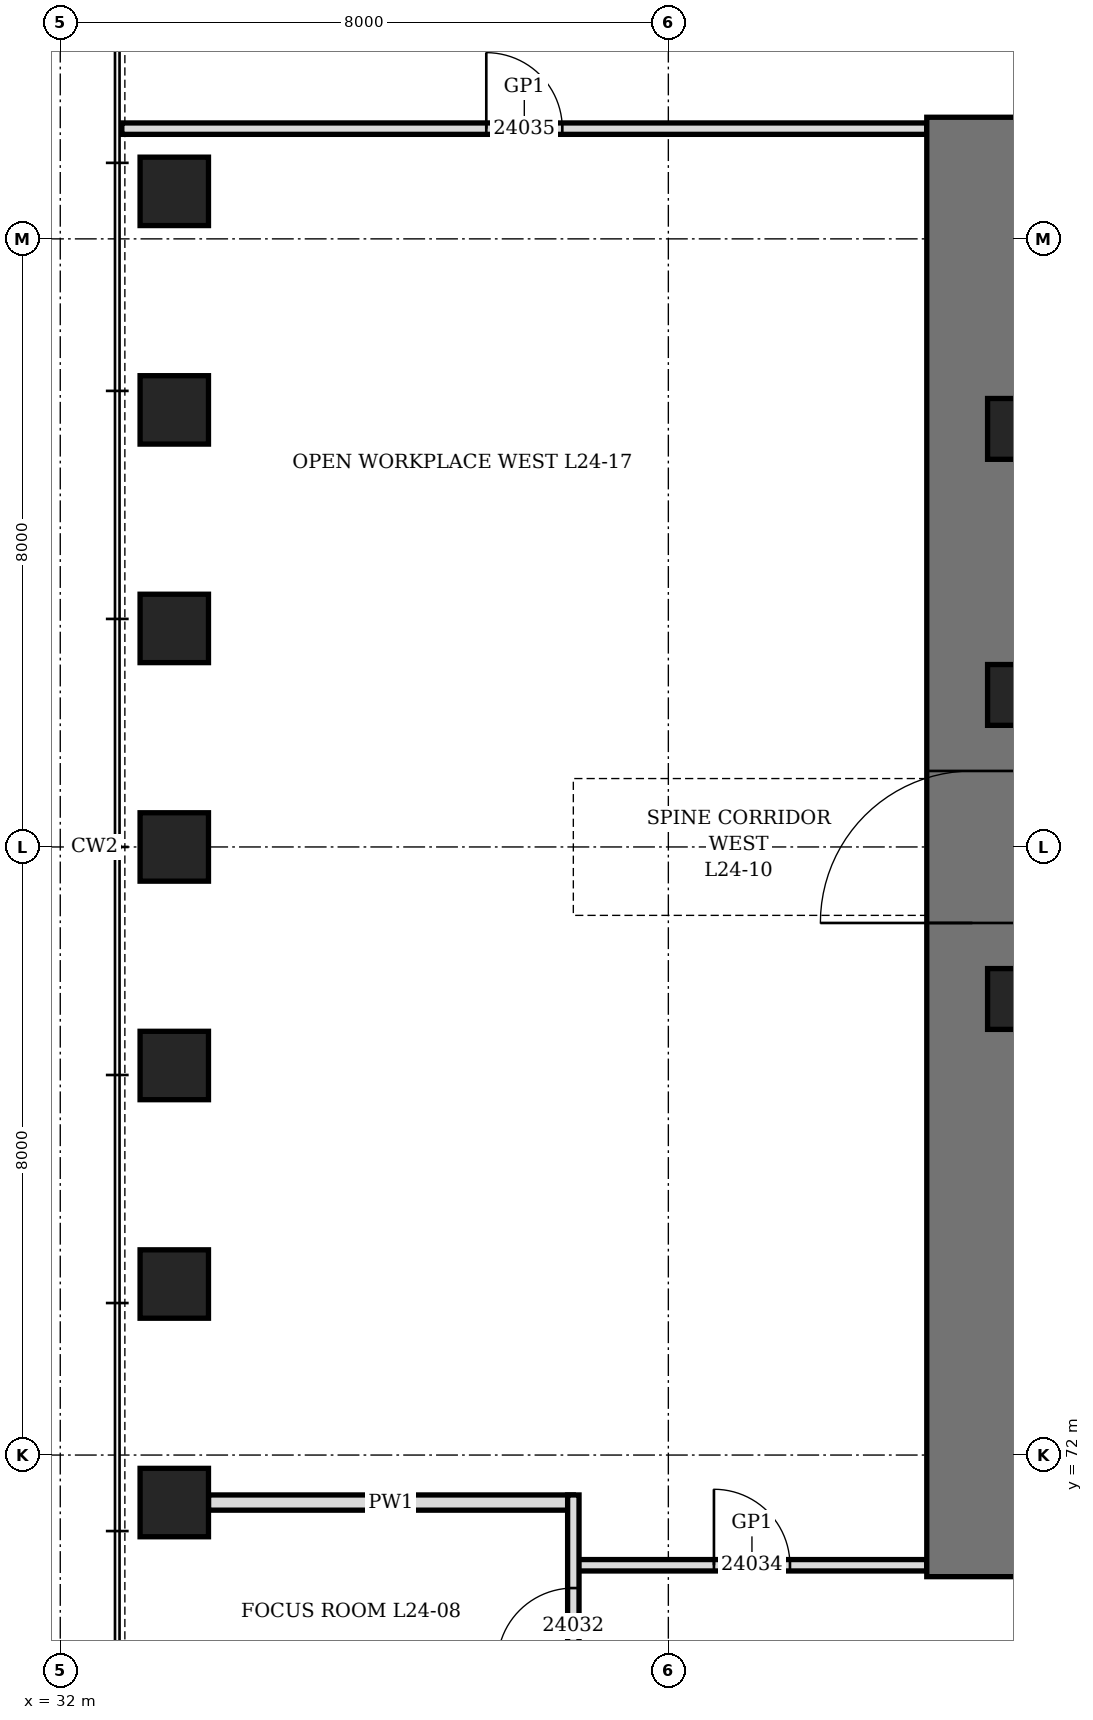
"""IFC4 building model, lengths in metres.
Left out: names, types, materials, properties, quantities, classifications, styles, units other than length and angle.
Written with IfcOpenShell. Run it as: python <this file> out.ifc"""

import sys

from ifc_helpers import new_model, si_unit, direction, frame, frame_2d, origin, origin_2d, place, context, subcontext, project, spatial, rectangle, hollow_rectangle, extrude, element, fill, save


model = new_model("IFC4")
c1 = context("Model", 3, precision=1e-05, world=origin(), true_north=direction((0.0, 1.0)))
c2 = subcontext(c1, "Body", "Model", "MODEL_VIEW")
j1 = project(units=[si_unit("LENGTHUNIT", "METRE"), si_unit("PLANEANGLEUNIT", "RADIAN")], contexts=[c1])
p1 = place(None, origin())
s1 = spatial("IfcSite", under=j1, at=p1, CompositionType="ELEMENT")
p2 = place(p1, origin())
s2 = spatial("IfcBuilding", under=s1, at=p2, CompositionType="ELEMENT")
p3 = place(p2, frame((0.0, 0.0, 112.3)))
s3 = spatial("IfcBuildingStorey", under=s2, at=p3, CompositionType="ELEMENT", Elevation=112.3)
for number, where, z_axis, x_axis in (
    (1, (33.5, 88.625, 0.0), (0.0, 0.0, 1.0), (0.0, 1.0, 0.0)),
    (2, (33.5, 85.75, 0.0), (0.0, 0.0, 1.0), (0.0, 1.0, 0.0)),
    (3, (33.5, 82.875, 0.0), (0.0, 0.0, 1.0), (0.0, 1.0, 0.0)),
    (4, (33.5, 80.0, 0.0), (0.0, 0.0, 1.0), (0.0, 1.0, 0.0)),
    (5, (33.5, 77.125, 0.0), (0.0, 0.0, 1.0), (0.0, 1.0, 0.0)),
    (6, (33.5, 74.25, 0.0), (0.0, 0.0, 1.0), (0.0, 1.0, 0.0)),
    (7, (33.5, 71.375, 0.0), (0.0, 0.0, 1.0), (0.0, 1.0, 0.0)),
):
    element("IfcColumn", number, at=place(p3, frame(where, z_axis=z_axis, x_axis=x_axis)), inside=s3, PredefinedType="COLUMN", context=c2, shape_type="SweptSolid", body=[
        extrude(hollow_rectangle(XDim=0.9, YDim=0.9, WallThickness=0.15, at=origin_2d()), origin(), (0.0, 0.0, 1.0), 4.2),
    ])
p4 = place(p3, frame((44.0, 70.4, 0.0), z_axis=(0.0, 0.0, 1.0), x_axis=(0.0, 1.0, 0.0)))
e8 = element("IfcWall", 8, at=p4, inside=s3, PredefinedType="SHEAR", context=c2, shape_type="SweptSolid", body=[
    extrude(rectangle(XDim=19.2, YDim=1.2, at=frame_2d((9.6, 0.0))), origin(), (0.0, 0.0, 1.0), 4.2),
])
p5 = place(p4, frame((8.6, 0.0, 0.0)))
e9 = element("IfcOpeningElement", 9, at=p5, cuts=e8, PredefinedType="OPENING", context=c2, shape_type="SweptSolid", body=[
    extrude(rectangle(XDim=2.0, YDim=2.4, at=frame_2d((1.0, 1.2))), frame((0.0, 0.61, 0.0), z_axis=(0.0, -1.0, 0.0), x_axis=(1.0, 0.0, 0.0)), (0.0, 0.0, 1.0), 1.22),
])
for number, where, z_axis, x_axis in (
    (10, (44.6, 78.0, 0.0), (0.0, 0.0, 1.0), (1.0, 0.0, 0.0)),
    (11, (44.6, 82.0, 0.0), (0.0, 0.0, 1.0), (1.0, 0.0, 0.0)),
    (12, (44.6, 85.5, 0.0), (0.0, 0.0, 1.0), (1.0, 0.0, 0.0)),
):
    element("IfcColumn", number, at=place(p3, frame(where, z_axis=z_axis, x_axis=x_axis)), inside=s3, PredefinedType="COLUMN", context=c2, shape_type="SweptSolid", body=[
        extrude(hollow_rectangle(XDim=0.8, YDim=0.8, WallThickness=0.1, at=origin_2d()), origin(), (0.0, 0.0, 1.0), 4.2),
    ])
p6 = place(p3, frame((33.95, 71.375, 0.0), z_axis=(0.0, 0.0, 1.0), x_axis=(1.0, 0.0, 0.0)))
e13 = element("IfcWall", 13, at=p6, inside=s3, PredefinedType="PARTITIONING", context=c2, shape_type="SweptSolid", body=[
    extrude(rectangle(XDim=4.8, YDim=0.2, at=frame_2d((2.4, 0.0))), origin(), (0.0, 0.0, 1.0), 3.428),
])
p7 = place(p3, frame((38.8, 70.55, 0.0), z_axis=(0.0, 0.0, 1.0), x_axis=(1.0, 0.0, 0.0)))
e14 = element("IfcWall", 14, at=p7, inside=s3, PredefinedType="PARTITIONING", context=c2, shape_type="SweptSolid", body=[
    extrude(rectangle(XDim=4.6, YDim=0.15, at=frame_2d((2.3, 0.0))), origin(), (0.0, 0.0, 1.0), 4.04),
])
p8 = place(p7, frame((1.8, 0.0, 0.0)))
e15 = element("IfcOpeningElement", 15, at=p8, cuts=e14, PredefinedType="OPENING", context=c2, shape_type="SweptSolid", body=[
    extrude(rectangle(XDim=1.0, YDim=2.4, at=frame_2d((0.5, 1.2))), frame((0.0, 0.085, 0.0), z_axis=(0.0, -1.0, 0.0), x_axis=(1.0, 0.0, 0.0)), (0.0, 0.0, 1.0), 0.17),
])
p9 = place(p3, frame((32.81, 89.45, 0.0), z_axis=(0.0, 0.0, 1.0), x_axis=(1.0, 0.0, 0.0)))
e16 = element("IfcWall", 16, at=p9, inside=s3, PredefinedType="PARTITIONING", context=c2, shape_type="SweptSolid", body=[
    extrude(rectangle(XDim=10.59, YDim=0.15, at=frame_2d((5.295, 0.0))), origin(), (0.0, 0.0, 1.0), 4.04),
])
p10 = place(p9, frame((4.795, 0.0, 0.0)))
e17 = element("IfcOpeningElement", 17, at=p10, cuts=e16, PredefinedType="OPENING", context=c2, shape_type="SweptSolid", body=[
    extrude(rectangle(XDim=1.0, YDim=2.4, at=frame_2d((0.5, 1.2))), frame((0.0, 0.085, 0.0), z_axis=(0.0, -1.0, 0.0), x_axis=(1.0, 0.0, 0.0)), (0.0, 0.0, 1.0), 0.17),
])
p11 = place(p3, frame((38.75, 63.2, 0.0), z_axis=(0.0, 0.0, 1.0), x_axis=(0.0, 1.0, 0.0)))
e18 = element("IfcWall", 18, at=p11, inside=s3, PredefinedType="PARTITIONING", context=c2, shape_type="SweptSolid", body=[
    extrude(rectangle(XDim=8.275, YDim=0.15, at=frame_2d((4.138, 0.0))), origin(), (0.0, 0.0, 1.0), 4.04),
])
p12 = place(p11, frame((0.488, 0.0, 0.0)))
e19 = element("IfcOpeningElement", 19, at=p12, cuts=e18, PredefinedType="OPENING", context=c2, shape_type="SweptSolid", body=[
    extrude(rectangle(XDim=1.0, YDim=2.4, at=frame_2d((0.5, 1.2))), frame((0.0, 0.085, 0.0), z_axis=(0.0, -1.0, 0.0), x_axis=(1.0, 0.0, 0.0)), (0.0, 0.0, 1.0), 0.17),
])
p13 = place(p11, frame((6.05, 0.0, 0.0)))
e20 = element("IfcOpeningElement", 20, at=p13, cuts=e18, PredefinedType="OPENING", context=c2, shape_type="SweptSolid", body=[
    extrude(rectangle(XDim=1.0, YDim=2.4, at=frame_2d((0.5, 1.2))), frame((0.0, 0.085, 0.0), z_axis=(0.0, -1.0, 0.0), x_axis=(1.0, 0.0, 0.0)), (0.0, 0.0, 1.0), 0.17),
])
p14 = place(p5, origin())
e21 = element("IfcDoor", 21, at=p14, inside=s3, OperationType="DOUBLE_DOOR_SINGLE_SWING", PredefinedType="DOOR", context=c2, shape_type="SweptSolid", body=[
    extrude(rectangle(XDim=2.0, YDim=2.4, at=frame_2d((1.0, 1.2))), frame((0.0, 0.35, 0.0), z_axis=(0.0, -1.0, 0.0), x_axis=(1.0, 0.0, 0.0)), (0.0, 0.0, 1.0), 0.7),
])
fill(e9, e21)
p15 = place(p13, origin())
e22 = element("IfcDoor", 22, at=p15, inside=s3, OperationType="SINGLE_SWING_RIGHT", PredefinedType="DOOR", context=c2, shape_type="SweptSolid", body=[
    extrude(rectangle(XDim=1.0, YDim=2.4, at=frame_2d((0.5, 1.2))), frame((0.0, 0.075, 0.0), z_axis=(0.0, -1.0, 0.0), x_axis=(1.0, 0.0, 0.0)), (0.0, 0.0, 1.0), 0.149),
])
fill(e20, e22)
p16 = place(p8, origin())
e23 = element("IfcDoor", 23, at=p16, inside=s3, OperationType="SINGLE_SWING_RIGHT", PredefinedType="DOOR", context=c2, shape_type="SweptSolid", body=[
    extrude(rectangle(XDim=1.0, YDim=2.4, at=frame_2d((0.5, 1.2))), frame((0.0, 0.075, 0.0), z_axis=(0.0, -1.0, 0.0), x_axis=(1.0, 0.0, 0.0)), (0.0, 0.0, 1.0), 0.149),
])
fill(e15, e23)
p17 = place(p10, origin())
e24 = element("IfcDoor", 24, at=p17, inside=s3, OperationType="SINGLE_SWING_RIGHT", PredefinedType="DOOR", context=c2, shape_type="SweptSolid", body=[
    extrude(rectangle(XDim=1.0, YDim=2.4, at=frame_2d((0.5, 1.2))), frame((0.0, 0.075, 0.0), z_axis=(0.0, -1.0, 0.0), x_axis=(1.0, 0.0, 0.0)), (0.0, 0.0, 1.0), 0.149),
])
fill(e17, e24)
save(model, sys.argv[1])
